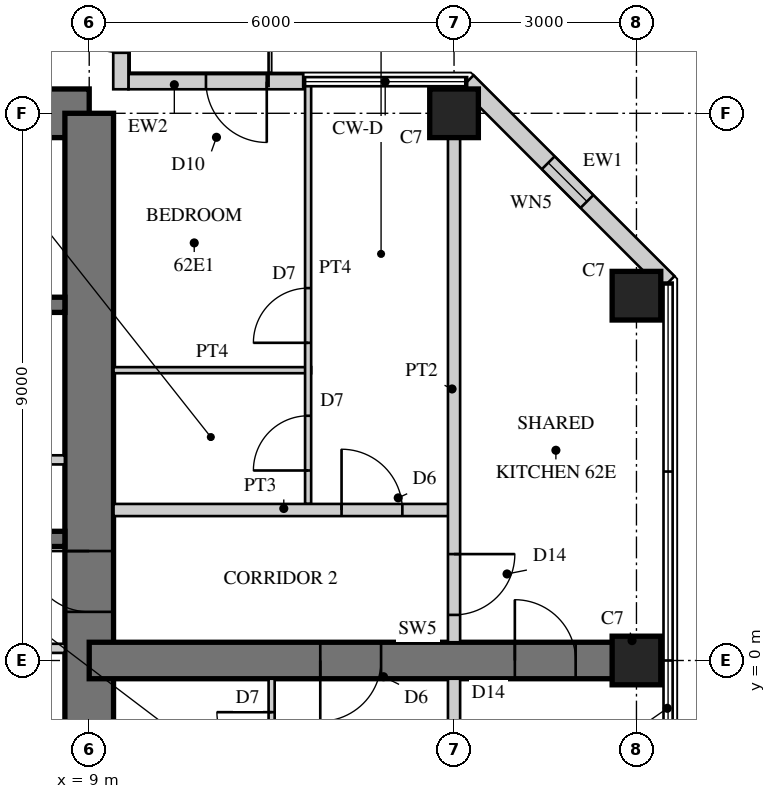
"""IFC4 building model, lengths in metres.
Left out: names, types, materials, properties, quantities, classifications, styles, units other than length and angle.
Written with IfcOpenShell. Run it as: python <this file> out.ifc"""

import sys

from ifc_helpers import new_model, si_unit, direction, frame, frame_2d, origin, origin_2d, place, context, subcontext, project, spatial, rectangle, hollow_rectangle, extrude, element, fill, save


model = new_model("IFC4")
c1 = context("Model", 3, precision=1e-05, world=origin(), true_north=direction((0.0, 1.0)))
c2 = subcontext(c1, "Body", "Model", "MODEL_VIEW")
j1 = project(units=[si_unit("LENGTHUNIT", "METRE"), si_unit("PLANEANGLEUNIT", "RADIAN")], contexts=[c1])
p1 = place(None, origin())
s1 = spatial("IfcSite", under=j1, at=p1, CompositionType="ELEMENT")
p2 = place(p1, origin())
s2 = spatial("IfcBuilding", under=s1, at=p2, CompositionType="ELEMENT")
p3 = place(p2, frame((0.0, 0.0, 242.5)))
s3 = spatial("IfcBuildingStorey", under=s2, at=p3, CompositionType="ELEMENT", Elevation=242.5)
p4 = place(p3, frame((9.0, 9.0, 0.0), z_axis=(0.0, 0.0, 1.0), x_axis=(-1.0, 0.0, 0.0)))
e1 = element("IfcWall", 1, at=p4, inside=s3, PredefinedType="SHEAR", context=c2, shape_type="SweptSolid", body=[
    extrude(rectangle(XDim=18.0, YDim=0.8, at=frame_2d((9.0, 0.0))), origin(), (0.0, 0.0, 1.0), 3.4),
])
p5 = place(p4, frame((9.8, 0.0, 0.0)))
e2 = element("IfcOpeningElement", 2, at=p5, cuts=e1, PredefinedType="OPENING", context=c2, shape_type="SweptSolid", body=[
    extrude(rectangle(XDim=1.0, YDim=2.4, at=frame_2d((0.5, 1.2))), frame((0.0, 0.41, 0.0), z_axis=(0.0, -1.0, 0.0), x_axis=(1.0, 0.0, 0.0)), (0.0, 0.0, 1.0), 0.82),
])
p6 = place(p3, frame((9.0, -9.0, 0.0), z_axis=(0.0, 0.0, 1.0), x_axis=(0.0, 1.0, 0.0)))
e3 = element("IfcWall", 3, at=p6, inside=s3, PredefinedType="SHEAR", context=c2, shape_type="SweptSolid", body=[
    extrude(rectangle(XDim=18.0, YDim=0.8, at=frame_2d((9.0, 0.0))), origin(), (0.0, 0.0, 1.0), 3.4),
])
p7 = place(p6, frame((9.8, 0.0, 0.0)))
e4 = element("IfcOpeningElement", 4, at=p7, cuts=e3, PredefinedType="OPENING", context=c2, shape_type="SweptSolid", body=[
    extrude(rectangle(XDim=1.0, YDim=2.4, at=frame_2d((0.5, 1.2))), frame((0.0, 0.41, 0.0), z_axis=(0.0, -1.0, 0.0), x_axis=(1.0, 0.0, 0.0)), (0.0, 0.0, 1.0), 0.82),
])
p8 = place(p3, frame((1.925, 2.0, 0.0), z_axis=(0.0, 0.0, 1.0), x_axis=(1.0, 0.0, 0.0)))
e5 = element("IfcWall", 5, at=p8, inside=s3, PredefinedType="SHEAR", context=c2, shape_type="SweptSolid", body=[
    extrude(rectangle(XDim=6.675, YDim=0.25, at=frame_2d((3.337, 0.0))), origin(), (0.0, 0.0, 1.0), 3.4),
])
p9 = place(p3, frame((1.925, 5.85, 0.0), z_axis=(0.0, 0.0, 1.0), x_axis=(1.0, 0.0, 0.0)))
e6 = element("IfcWall", 6, at=p9, inside=s3, PredefinedType="SHEAR", context=c2, shape_type="SweptSolid", body=[
    extrude(rectangle(XDim=6.675, YDim=0.25, at=frame_2d((3.337, 0.0))), origin(), (0.0, 0.0, 1.0), 3.4),
])
p10 = place(p9, frame((0.546, 0.0, 0.0)))
e7 = element("IfcOpeningElement", 7, at=p10, cuts=e6, PredefinedType="OPENING", context=c2, shape_type="SweptSolid", body=[
    extrude(rectangle(XDim=1.0, YDim=2.1, at=frame_2d((0.5, 1.05))), frame((0.0, 0.135, 0.0), z_axis=(0.0, -1.0, 0.0), x_axis=(1.0, 0.0, 0.0)), (0.0, 0.0, 1.0), 0.27),
])
p11 = place(p9, frame((2.837, 0.0, 0.0)))
e8 = element("IfcOpeningElement", 8, at=p11, cuts=e6, PredefinedType="OPENING", context=c2, shape_type="SweptSolid", body=[
    extrude(rectangle(XDim=1.0, YDim=2.1, at=frame_2d((0.5, 1.05))), frame((0.0, 0.135, 0.0), z_axis=(0.0, -1.0, 0.0), x_axis=(1.0, 0.0, 0.0)), (0.0, 0.0, 1.0), 0.27),
])
p12 = place(p3, frame((1.925, 3.3, 0.0), z_axis=(0.0, 0.0, 1.0), x_axis=(1.0, 0.0, 0.0)))
e9 = element("IfcWall", 9, at=p12, inside=s3, PredefinedType="PARTITIONING", context=c2, shape_type="SweptSolid", body=[
    extrude(rectangle(XDim=6.675, YDim=0.15, at=frame_2d((3.337, 0.0))), origin(), (0.0, 0.0, 1.0), 3.4),
])
p13 = place(p12, frame((0.075, 0.0, 0.0)))
e10 = element("IfcOpeningElement", 10, at=p13, cuts=e9, PredefinedType="OPENING", context=c2, shape_type="SweptSolid", body=[
    extrude(rectangle(XDim=0.8, YDim=2.1, at=frame_2d((0.4, 1.05))), frame((0.0, 0.085, 0.0), z_axis=(0.0, -1.0, 0.0), x_axis=(1.0, 0.0, 0.0)), (0.0, 0.0, 1.0), 0.17),
])
p14 = place(p12, frame((3.675, 0.0, 0.0)))
e11 = element("IfcOpeningElement", 11, at=p14, cuts=e9, PredefinedType="OPENING", context=c2, shape_type="SweptSolid", body=[
    extrude(rectangle(XDim=0.8, YDim=2.1, at=frame_2d((0.4, 1.05))), frame((0.0, 0.085, 0.0), z_axis=(0.0, -1.0, 0.0), x_axis=(1.0, 0.0, 0.0)), (0.0, 0.0, 1.0), 0.17),
])
p15 = place(p3, frame((9.0, 0.0, 0.0), z_axis=(0.0, 0.0, 1.0), x_axis=(1.0, 0.0, 0.0)))
e12 = element("IfcWall", 12, at=p15, inside=s3, PredefinedType="SHEAR", context=c2, shape_type="SweptSolid", body=[
    extrude(rectangle(XDim=9.0, YDim=0.6, at=frame_2d((4.5, 0.0))), origin(), (0.0, 0.0, 1.0), 3.4),
])
p16 = place(p15, frame((3.8, 0.0, 0.0)))
e13 = element("IfcOpeningElement", 13, at=p16, cuts=e12, PredefinedType="OPENING", context=c2, shape_type="SweptSolid", body=[
    extrude(rectangle(XDim=1.0, YDim=2.15, at=frame_2d((0.5, 1.075))), frame((0.0, 0.31, 0.0), z_axis=(0.0, -1.0, 0.0), x_axis=(1.0, 0.0, 0.0)), (0.0, 0.0, 1.0), 0.62),
])
p17 = place(p15, frame((7.0, 0.0, 0.0)))
e14 = element("IfcOpeningElement", 14, at=p17, cuts=e12, PredefinedType="OPENING", context=c2, shape_type="SweptSolid", body=[
    extrude(rectangle(XDim=1.0, YDim=2.2, at=frame_2d((0.5, 1.1))), frame((0.0, 0.31, 0.0), z_axis=(0.0, -1.0, 0.0), x_axis=(1.0, 0.0, 0.0)), (0.0, 0.0, 1.0), 0.62),
])
for number, where, z_axis, x_axis in (
    (15, (15.0, 9.0, 0.0), (0.0, 0.0, 1.0), (1.0, 0.0, 0.0)),
    (16, (18.0, 0.0, 0.0), (0.0, 0.0, 1.0), (1.0, 0.0, 0.0)),
    (17, (18.0, 6.0, 0.0), (0.0, 0.0, 1.0), (1.0, 0.0, 0.0)),
):
    element("IfcColumn", number, at=place(p3, frame(where, z_axis=z_axis, x_axis=x_axis)), inside=s3, PredefinedType="COLUMN", context=c2, shape_type="SweptSolid", body=[
        extrude(rectangle(XDim=0.8, YDim=0.8, at=origin_2d()), origin(), (0.0, 0.0, 1.0), 3.4),
    ])
p18 = place(p3, frame((18.52, 6.215, 0.0), z_axis=(0.0, 0.0, 1.0), x_axis=(-0.707106781187, 0.707106781187, 0.0)))
e18 = element("IfcWall", 18, at=p18, inside=s3, PredefinedType="SOLIDWALL", context=c2, shape_type="SweptSolid", body=[
    extrude(rectangle(XDim=4.674, YDim=0.3, at=frame_2d((2.337, 0.0))), origin(), (0.0, 0.0, 1.0), 3.22),
])
p19 = place(p18, frame((1.887, 0.0, 0.3)))
e19 = element("IfcOpeningElement", 19, at=p19, cuts=e18, PredefinedType="OPENING", context=c2, shape_type="SweptSolid", body=[
    extrude(rectangle(XDim=0.9, YDim=2.4, at=frame_2d((0.45, 1.2))), frame((0.0, 0.16, 0.0), z_axis=(0.0, -1.0, 0.0), x_axis=(1.0, 0.0, 0.0)), (0.0, 0.0, 1.0), 0.32),
])
p20 = place(p3, frame((12.52, 9.52, 0.0), z_axis=(0.0, 0.0, 1.0), x_axis=(-1.0, 0.0, 0.0)))
e20 = element("IfcWall", 20, at=p20, inside=s3, PredefinedType="SOLIDWALL", context=c2, shape_type="SweptSolid", body=[
    extrude(rectangle(XDim=2.875, YDim=0.25, at=frame_2d((1.438, 0.0))), origin(), (0.0, 0.0, 1.0), 3.22),
])
p21 = place(p20, frame((0.6, 0.0, 0.0)))
e21 = element("IfcOpeningElement", 21, at=p21, cuts=e20, PredefinedType="OPENING", context=c2, shape_type="SweptSolid", body=[
    extrude(rectangle(XDim=1.0, YDim=2.2, at=frame_2d((0.5, 1.1))), frame((0.0, 0.135, 0.0), z_axis=(0.0, -1.0, 0.0), x_axis=(1.0, 0.0, 0.0)), (0.0, 0.0, 1.0), 0.27),
])
p22 = place(p3, frame((9.52, 9.395, 0.0), z_axis=(0.0, 0.0, 1.0), x_axis=(0.0, 1.0, 0.0)))
e22 = element("IfcWall", 22, at=p22, inside=s3, PredefinedType="SOLIDWALL", context=c2, shape_type="SweptSolid", body=[
    extrude(rectangle(XDim=3.125, YDim=0.25, at=frame_2d((1.562, 0.0))), origin(), (0.0, 0.0, 1.0), 3.22),
])
p23 = place(p22, frame((0.6, 0.0, 0.0)))
e23 = element("IfcOpeningElement", 23, at=p23, cuts=e22, PredefinedType="OPENING", context=c2, shape_type="SweptSolid", body=[
    extrude(rectangle(XDim=1.0, YDim=2.2, at=frame_2d((0.5, 1.1))), frame((0.0, 0.135, 0.0), z_axis=(0.0, -1.0, 0.0), x_axis=(1.0, 0.0, 0.0)), (0.0, 0.0, 1.0), 0.27),
])
p24 = place(p3, frame((2.325, 0.2, 0.0), z_axis=(0.0, 0.0, 1.0), x_axis=(1.0, 0.0, 0.0)))
e24 = element("IfcWall", 24, at=p24, inside=s3, PredefinedType="PARTITIONING", context=c2, shape_type="SweptSolid", body=[
    extrude(rectangle(XDim=6.275, YDim=0.15, at=frame_2d((3.138, 0.0))), origin(), (0.0, 0.0, 1.0), 3.22),
])
p25 = place(p24, frame((0.4, 0.0, 0.0)))
e25 = element("IfcOpeningElement", 25, at=p25, cuts=e24, PredefinedType="OPENING", context=c2, shape_type="SweptSolid", body=[
    extrude(rectangle(XDim=1.0, YDim=2.1, at=frame_2d((0.5, 1.05))), frame((0.0, 0.085, 0.0), z_axis=(0.0, -1.0, 0.0), x_axis=(1.0, 0.0, 0.0)), (0.0, 0.0, 1.0), 0.17),
])
p26 = place(p3, frame((9.4, 4.775, 0.0), z_axis=(0.0, 0.0, 1.0), x_axis=(1.0, 0.0, 0.0)))
e26 = element("IfcWall", 26, at=p26, inside=s3, PredefinedType="PARTITIONING", context=c2, shape_type="SweptSolid", body=[
    extrude(rectangle(XDim=3.25, YDim=0.1, at=frame_2d((1.625, 0.0))), origin(), (0.0, 0.0, 1.0), 3.22),
])
p27 = place(p3, frame((12.6, 2.575, 0.0), z_axis=(0.0, 0.0, 1.0), x_axis=(0.0, 1.0, 0.0)))
e27 = element("IfcWall", 27, at=p27, inside=s3, PredefinedType="PARTITIONING", context=c2, shape_type="SweptSolid", body=[
    extrude(rectangle(XDim=6.905, YDim=0.1, at=frame_2d((3.453, 0.0))), origin(), (0.0, 0.0, 1.0), 3.22),
])
p28 = place(p27, frame((0.55, 0.0, 0.0)))
e28 = element("IfcOpeningElement", 28, at=p28, cuts=e27, PredefinedType="OPENING", context=c2, shape_type="SweptSolid", body=[
    extrude(rectangle(XDim=0.9, YDim=2.1, at=frame_2d((0.45, 1.05))), frame((0.0, 0.06, 0.0), z_axis=(0.0, -1.0, 0.0), x_axis=(1.0, 0.0, 0.0)), (0.0, 0.0, 1.0), 0.12),
])
p29 = place(p27, frame((2.65, 0.0, 0.0)))
e29 = element("IfcOpeningElement", 29, at=p29, cuts=e27, PredefinedType="OPENING", context=c2, shape_type="SweptSolid", body=[
    extrude(rectangle(XDim=0.9, YDim=2.1, at=frame_2d((0.45, 1.05))), frame((0.0, 0.06, 0.0), z_axis=(0.0, -1.0, 0.0), x_axis=(1.0, 0.0, 0.0)), (0.0, 0.0, 1.0), 0.12),
])
p30 = place(p3, frame((12.0, -9.395, 0.0), z_axis=(0.0, 0.0, 1.0), x_axis=(0.0, 1.0, 0.0)))
e30 = element("IfcWall", 30, at=p30, inside=s3, PredefinedType="PARTITIONING", context=c2, shape_type="SweptSolid", body=[
    extrude(rectangle(XDim=9.095, YDim=0.1, at=frame_2d((4.547, 0.0))), origin(), (0.0, 0.0, 1.0), 3.22),
])
p31 = place(p30, frame((5.545, 0.0, 0.0)))
e31 = element("IfcOpeningElement", 31, at=p31, cuts=e30, PredefinedType="OPENING", context=c2, shape_type="SweptSolid", body=[
    extrude(rectangle(XDim=0.9, YDim=2.1, at=frame_2d((0.45, 1.05))), frame((0.0, 0.06, 0.0), z_axis=(0.0, -1.0, 0.0), x_axis=(1.0, 0.0, 0.0)), (0.0, 0.0, 1.0), 0.12),
])
p32 = place(p30, frame((7.645, 0.0, 0.0)))
e32 = element("IfcOpeningElement", 32, at=p32, cuts=e30, PredefinedType="OPENING", context=c2, shape_type="SweptSolid", body=[
    extrude(rectangle(XDim=0.9, YDim=2.1, at=frame_2d((0.45, 1.05))), frame((0.0, 0.06, 0.0), z_axis=(0.0, -1.0, 0.0), x_axis=(1.0, 0.0, 0.0)), (0.0, 0.0, 1.0), 0.12),
])
p33 = place(p3, frame((9.4, 2.475, 0.0), z_axis=(0.0, 0.0, 1.0), x_axis=(1.0, 0.0, 0.0)))
e33 = element("IfcWall", 33, at=p33, inside=s3, PredefinedType="SOLIDWALL", context=c2, shape_type="SweptSolid", body=[
    extrude(rectangle(XDim=5.6, YDim=0.2, at=frame_2d((2.8, 0.0))), origin(), (0.0, 0.0, 1.0), 3.22),
])
p34 = place(p33, frame((3.75, 0.0, 0.0)))
e34 = element("IfcOpeningElement", 34, at=p34, cuts=e33, PredefinedType="OPENING", context=c2, shape_type="SweptSolid", body=[
    extrude(rectangle(XDim=1.0, YDim=2.15, at=frame_2d((0.5, 1.075))), frame((0.0, 0.11, 0.0), z_axis=(0.0, -1.0, 0.0), x_axis=(1.0, 0.0, 0.0)), (0.0, 0.0, 1.0), 0.22),
])
p35 = place(p3, frame((15.0, -8.6, 0.0), z_axis=(0.0, 0.0, 1.0), x_axis=(0.0, 1.0, 0.0)))
e35 = element("IfcWall", 35, at=p35, inside=s3, PredefinedType="SOLIDWALL", context=c2, shape_type="SweptSolid", body=[
    extrude(rectangle(XDim=8.3, YDim=0.2, at=frame_2d((4.15, 0.0))), origin(), (0.0, 0.0, 1.0), 2.52),
])
p36 = place(p3, frame((15.0, 0.3, 0.0), z_axis=(0.0, 0.0, 1.0), x_axis=(0.0, 1.0, 0.0)))
e36 = element("IfcWall", 36, at=p36, inside=s3, PredefinedType="SOLIDWALL", context=c2, shape_type="SweptSolid", body=[
    extrude(rectangle(XDim=8.3, YDim=0.2, at=frame_2d((4.15, 0.0))), origin(), (0.0, 0.0, 1.0), 2.52),
])
p37 = place(p36, frame((0.45, 0.0, 0.0)))
e37 = element("IfcOpeningElement", 37, at=p37, cuts=e36, PredefinedType="OPENING", context=c2, shape_type="SweptSolid", body=[
    extrude(rectangle(XDim=1.0, YDim=2.2, at=frame_2d((0.5, 1.1))), frame((0.0, 0.11, 0.0), z_axis=(0.0, -1.0, 0.0), x_axis=(1.0, 0.0, 0.0)), (0.0, 0.0, 1.0), 0.22),
])
p38 = place(p19, origin())
e38 = element("IfcWindow", 38, at=p38, inside=s3, PartitioningType="SINGLE_PANEL", PredefinedType="WINDOW", context=c2, shape_type="SweptSolid", body=[
    extrude(hollow_rectangle(XDim=0.9, YDim=2.4, WallThickness=0.06, at=frame_2d((0.45, 1.2))), frame((0.0, 0.03, 0.0), z_axis=(0.0, -1.0, 0.0), x_axis=(1.0, 0.0, 0.0)), (0.0, 0.0, 1.0), 0.06),
    extrude(rectangle(XDim=0.779, YDim=2.279, at=frame_2d((0.45, 1.2))), frame((0.0, 0.03, 0.0), z_axis=(0.0, -1.0, 0.0), x_axis=(1.0, 0.0, 0.0)), (0.0, 0.0, 1.0), 0.06),
])
fill(e19, e38)
p39 = place(p21, origin())
e39 = element("IfcDoor", 39, at=p39, inside=s3, OperationType="SINGLE_SWING_LEFT", PredefinedType="DOOR", context=c2, shape_type="SweptSolid", body=[
    extrude(hollow_rectangle(XDim=1.0, YDim=2.2, WallThickness=0.06, at=frame_2d((0.5, 1.1))), frame((0.0, 0.025, 0.0), z_axis=(0.0, -1.0, 0.0), x_axis=(1.0, 0.0, 0.0)), (0.0, 0.0, 1.0), 0.05),
    extrude(rectangle(XDim=0.879, YDim=2.079, at=frame_2d((0.5, 1.1))), frame((0.0, 0.025, 0.0), z_axis=(0.0, -1.0, 0.0), x_axis=(1.0, 0.0, 0.0)), (0.0, 0.0, 1.0), 0.05),
])
fill(e21, e39)
p40 = place(p23, origin())
e40 = element("IfcDoor", 40, at=p40, inside=s3, OperationType="SINGLE_SWING_RIGHT", PredefinedType="DOOR", context=c2, shape_type="SweptSolid", body=[
    extrude(hollow_rectangle(XDim=1.0, YDim=2.2, WallThickness=0.06, at=frame_2d((0.5, 1.1))), frame((0.0, 0.025, 0.0), z_axis=(0.0, -1.0, 0.0), x_axis=(1.0, 0.0, 0.0)), (0.0, 0.0, 1.0), 0.05),
    extrude(rectangle(XDim=0.879, YDim=2.079, at=frame_2d((0.5, 1.1))), frame((0.0, 0.025, 0.0), z_axis=(0.0, -1.0, 0.0), x_axis=(1.0, 0.0, 0.0)), (0.0, 0.0, 1.0), 0.05),
])
fill(e23, e40)
p41 = place(p28, origin())
e41 = element("IfcDoor", 41, at=p41, inside=s3, OperationType="SINGLE_SWING_LEFT", PredefinedType="DOOR", context=c2, shape_type="SweptSolid", body=[
    extrude(rectangle(XDim=0.9, YDim=2.1, at=frame_2d((0.45, 1.05))), frame((0.0, 0.025, 0.0), z_axis=(0.0, -1.0, 0.0), x_axis=(1.0, 0.0, 0.0)), (0.0, 0.0, 1.0), 0.05),
])
fill(e28, e41)
p42 = place(p29, origin())
e42 = element("IfcDoor", 42, at=p42, inside=s3, OperationType="SINGLE_SWING_LEFT", PredefinedType="DOOR", context=c2, shape_type="SweptSolid", body=[
    extrude(rectangle(XDim=0.9, YDim=2.1, at=frame_2d((0.45, 1.05))), frame((0.0, 0.025, 0.0), z_axis=(0.0, -1.0, 0.0), x_axis=(1.0, 0.0, 0.0)), (0.0, 0.0, 1.0), 0.05),
])
fill(e29, e42)
p43 = place(p32, origin())
e43 = element("IfcDoor", 43, at=p43, inside=s3, OperationType="SINGLE_SWING_RIGHT", PredefinedType="DOOR", context=c2, shape_type="SweptSolid", body=[
    extrude(rectangle(XDim=0.9, YDim=2.1, at=frame_2d((0.45, 1.05))), frame((0.0, 0.025, 0.0), z_axis=(0.0, -1.0, 0.0), x_axis=(1.0, 0.0, 0.0)), (0.0, 0.0, 1.0), 0.05),
])
fill(e32, e43)
p44 = place(p34, origin())
e44 = element("IfcDoor", 44, at=p44, inside=s3, OperationType="SINGLE_SWING_LEFT", PredefinedType="DOOR", context=c2, shape_type="SweptSolid", body=[
    extrude(rectangle(XDim=1.0, YDim=2.15, at=frame_2d((0.5, 1.075))), frame((0.0, 0.025, 0.0), z_axis=(0.0, -1.0, 0.0), x_axis=(1.0, 0.0, 0.0)), (0.0, 0.0, 1.0), 0.05),
])
fill(e34, e44)
p45 = place(p37, frame((1.0, 0.0, 0.0), z_axis=(0.0, 0.0, 1.0), x_axis=(-1.0, 0.0, 0.0)))
e45 = element("IfcDoor", 45, at=p45, inside=s3, OperationType="SINGLE_SWING_LEFT", PredefinedType="DOOR", context=c2, shape_type="SweptSolid", body=[
    extrude(rectangle(XDim=1.0, YDim=2.2, at=frame_2d((0.5, 1.1))), frame((0.0, 0.025, 0.0), z_axis=(0.0, -1.0, 0.0), x_axis=(1.0, 0.0, 0.0)), (0.0, 0.0, 1.0), 0.05),
])
fill(e37, e45)
p46 = place(p16, frame((1.0, 0.0, 0.0), z_axis=(0.0, 0.0, 1.0), x_axis=(-1.0, 0.0, 0.0)))
e46 = element("IfcDoor", 46, at=p46, inside=s3, OperationType="SINGLE_SWING_RIGHT", PredefinedType="DOOR", context=c2, shape_type="SweptSolid", body=[
    extrude(rectangle(XDim=1.0, YDim=2.15, at=frame_2d((0.5, 1.075))), frame((0.0, 0.025, 0.0), z_axis=(0.0, -1.0, 0.0), x_axis=(1.0, 0.0, 0.0)), (0.0, 0.0, 1.0), 0.05),
])
fill(e13, e46)
p47 = place(p17, origin())
e47 = element("IfcDoor", 47, at=p47, inside=s3, OperationType="SINGLE_SWING_LEFT", PredefinedType="DOOR", context=c2, shape_type="SweptSolid", body=[
    extrude(rectangle(XDim=1.0, YDim=2.2, at=frame_2d((0.5, 1.1))), frame((0.0, 0.025, 0.0), z_axis=(0.0, -1.0, 0.0), x_axis=(1.0, 0.0, 0.0)), (0.0, 0.0, 1.0), 0.05),
])
fill(e14, e47)
p48 = place(p7, origin())
e48 = element("IfcDoor", 48, at=p48, inside=s3, OperationType="SINGLE_SWING_RIGHT", PredefinedType="DOOR", context=c2, shape_type="SweptSolid", body=[
    extrude(rectangle(XDim=1.0, YDim=2.4, at=frame_2d((0.5, 1.2))), frame((0.0, 0.055, 0.0), z_axis=(0.0, -1.0, 0.0), x_axis=(1.0, 0.0, 0.0)), (0.0, 0.0, 1.0), 0.05),
])
fill(e4, e48)
save(model, sys.argv[1])
